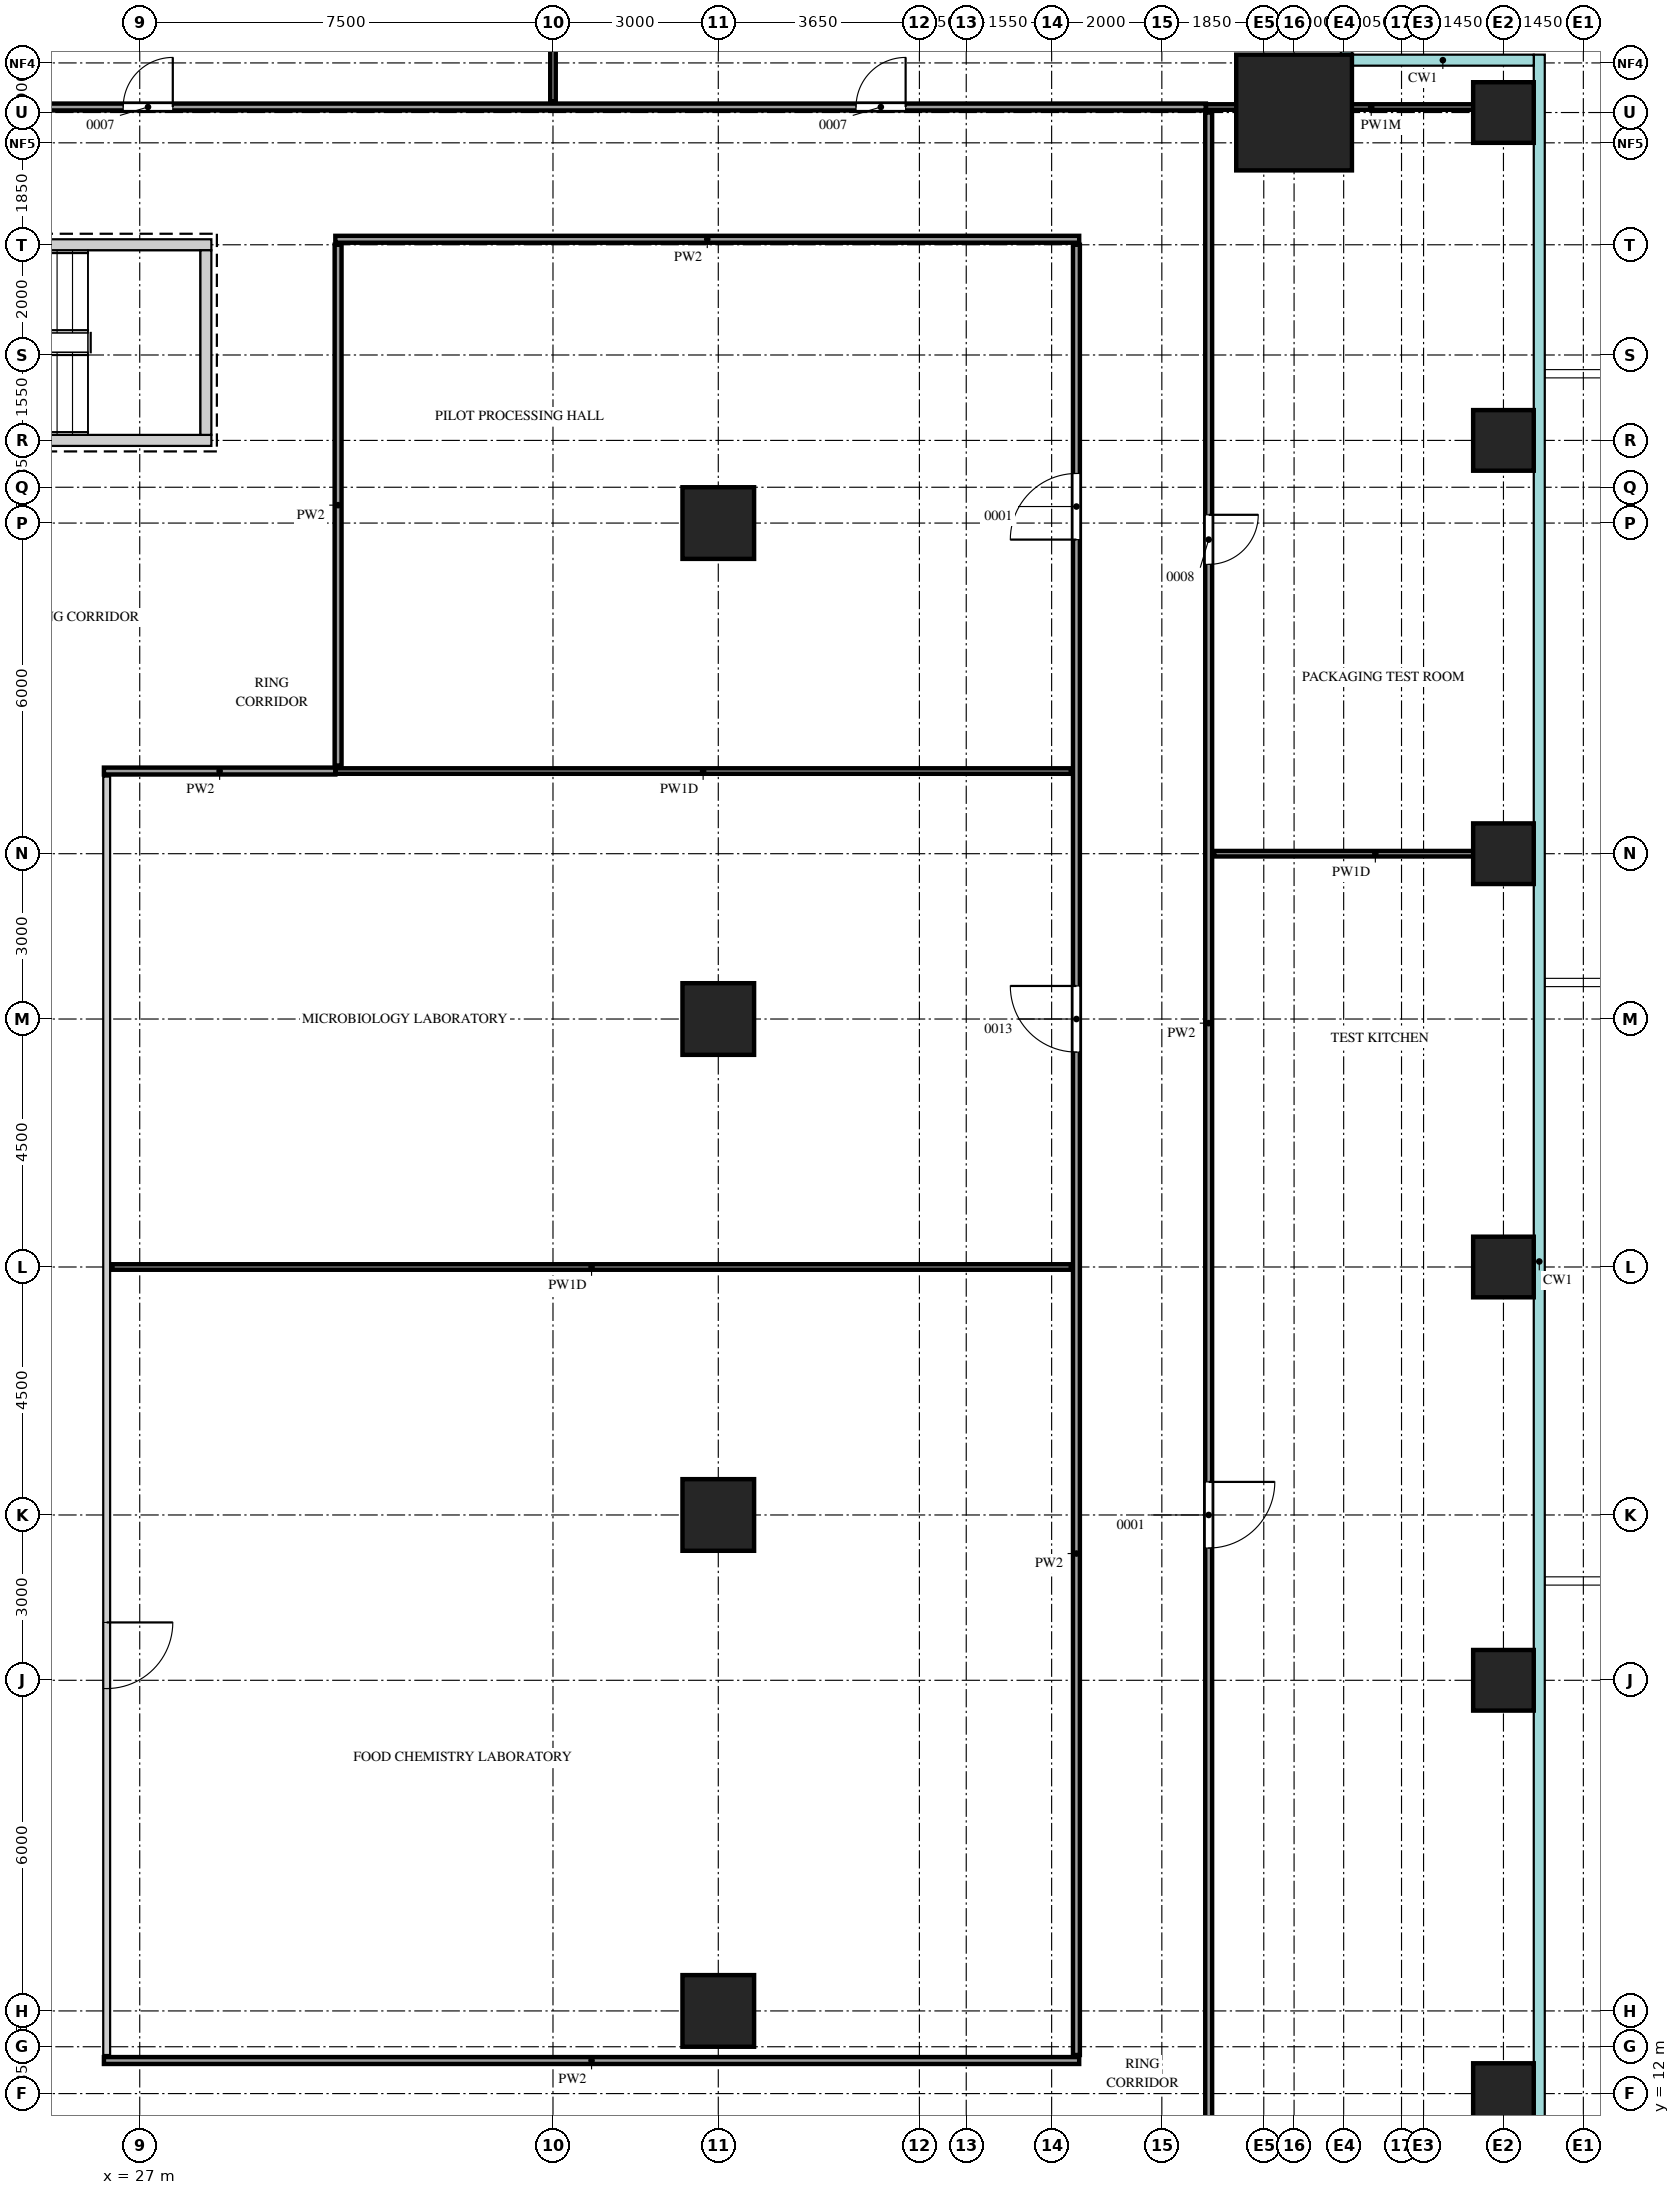
"""IFC4 building model, lengths in metres.
Left out: names, types, materials, properties, quantities, classifications, styles, units other than length and angle.
Written with IfcOpenShell. Run it as: python <this file> out.ifc"""

import sys

from ifc_helpers import new_model, si_unit, direction, frame, frame_2d, origin, origin_2d, place, context, subcontext, project, spatial, rectangle, extrude, source, transform, mapped, element, fill, save


model = new_model("IFC4")
c1 = context("Model", 3, precision=1e-05, world=origin(), true_north=direction((0.0, 1.0)))
c2 = subcontext(c1, "Body", "Model", "MODEL_VIEW")
j1 = project(units=[si_unit("LENGTHUNIT", "METRE"), si_unit("PLANEANGLEUNIT", "RADIAN")], contexts=[c1])
p1 = place(None, origin())
s1 = spatial("IfcSite", under=j1, at=p1, CompositionType="ELEMENT")
p2 = place(p1, origin())
s2 = spatial("IfcBuilding", under=s1, at=p2, CompositionType="ELEMENT")
p3 = place(p2, frame((0.0, 0.0, 119.1)))
s3 = spatial("IfcBuildingStorey", under=s2, at=p3, CompositionType="ELEMENT", Elevation=119.1)
m1 = source(origin(), c2, "Body", "SweptSolid", [
    extrude(rectangle(XDim=7.1, YDim=0.2, at=frame_2d((3.55, 0.0))), origin(), (0.0, 0.0, 1.0), 4.1),
])
p4 = place(p3, frame((21.2, 45.55, 0.0), z_axis=(0.0, 0.0, 1.0), x_axis=(1.0, 0.0, 0.0)))
e1 = element("IfcWall", 1, at=p4, inside=s3, PredefinedType="SHEAR", context=c2, shape_type="MappedRepresentation", body=[
    mapped(m1, transform((0.0, 0.0, 0.0))),
])
m2 = source(origin(), c2, "Body", "SweptSolid", [
    extrude(rectangle(XDim=1.2, YDim=2.1, at=frame_2d((0.6, 1.05))), frame((0.0, 0.11, 0.0), z_axis=(0.0, -1.0, 0.0), x_axis=(1.0, 0.0, 0.0)), (0.0, 0.0, 1.0), 0.22),
])
p5 = place(p4, frame((0.15, 0.0, 0.0)))
e2 = element("IfcOpeningElement", 2, at=p5, cuts=e1, PredefinedType="OPENING", context=c2, shape_type="MappedRepresentation", body=[
    mapped(m2, transform((0.0, 0.0, 0.0))),
])
p6 = place(p3, frame((21.2, 42.0, 0.0), z_axis=(0.0, 0.0, 1.0), x_axis=(1.0, 0.0, 0.0)))
e3 = element("IfcWall", 3, at=p6, inside=s3, PredefinedType="SHEAR", context=c2, shape_type="MappedRepresentation", body=[
    mapped(m1, transform((0.0, 0.0, 0.0))),
])
m3 = source(origin(), c2, "Body", "SweptSolid", [
    extrude(rectangle(XDim=3.35, YDim=0.2, at=frame_2d((1.675, 0.0))), origin(), (0.0, 0.0, 1.0), 4.1),
])
p7 = place(p3, frame((28.2, 42.1, 0.0), z_axis=(0.0, 0.0, 1.0), x_axis=(0.0, 1.0, 0.0)))
e4 = element("IfcWall", 4, at=p7, inside=s3, PredefinedType="SHEAR", context=c2, shape_type="MappedRepresentation", body=[
    mapped(m3, transform((0.0, 0.0, 0.0))),
])
m4 = source(origin(), c2, "Body", "SweptSolid", [
    extrude(rectangle(XDim=2.1, YDim=2.1, at=origin_2d()), origin(), (0.0, 0.0, 1.0), 4.4),
])
p8 = place(p3, frame((47.95, 47.95, 0.0), z_axis=(0.0, 0.0, 1.0), x_axis=(1.0, 0.0, 0.0)))
e5 = element("IfcColumn", 5, at=p8, inside=s3, PredefinedType="COLUMN", context=c2, shape_type="MappedRepresentation", body=[
    mapped(m4, transform((0.0, 0.0, 0.0))),
])
m5 = source(origin(), c2, "Body", "SweptSolid", [
    extrude(rectangle(XDim=1.1, YDim=1.1, at=origin_2d()), origin(), (0.0, 0.0, 1.0), 4.1),
])
for number, where, z_axis, x_axis in (
    (6, (51.75, 12.0, 0.0), (0.0, 0.0, 1.0), (1.0, 0.0, 0.0)),
    (7, (51.75, 19.5, 0.0), (0.0, 0.0, 1.0), (1.0, 0.0, 0.0)),
    (8, (51.75, 27.0, 0.0), (0.0, 0.0, 1.0), (1.0, 0.0, 0.0)),
    (9, (51.75, 34.5, 0.0), (0.0, 0.0, 1.0), (1.0, 0.0, 0.0)),
    (10, (51.75, 42.0, 0.0), (0.0, 0.0, 1.0), (1.0, 0.0, 0.0)),
    (11, (51.75, 47.95, 0.0), (0.0, 0.0, 1.0), (1.0, 0.0, 0.0)),
):
    element("IfcColumn", number, at=place(p3, frame(where, z_axis=z_axis, x_axis=x_axis)), inside=s3, PredefinedType="COLUMN", context=c2, shape_type="MappedRepresentation", body=[
        mapped(m5, transform((0.0, 0.0, 0.0))),
    ])
m6 = source(origin(), c2, "Body", "SweptSolid", [
    extrude(rectangle(XDim=1.3, YDim=1.3, at=origin_2d()), origin(), (0.0, 0.0, 1.0), 4.1),
])
for number, where, z_axis, x_axis in (
    (12, (37.5, 13.5, 0.0), (0.0, 0.0, 1.0), (1.0, 0.0, 0.0)),
    (13, (37.5, 22.5, 0.0), (0.0, 0.0, 1.0), (1.0, 0.0, 0.0)),
    (14, (37.5, 31.5, 0.0), (0.0, 0.0, 1.0), (1.0, 0.0, 0.0)),
    (15, (37.5, 40.5, 0.0), (0.0, 0.0, 1.0), (1.0, 0.0, 0.0)),
):
    element("IfcColumn", number, at=place(p3, frame(where, z_axis=z_axis, x_axis=x_axis)), inside=s3, PredefinedType="COLUMN", context=c2, shape_type="MappedRepresentation", body=[
        mapped(m6, transform((0.0, 0.0, 0.0))),
    ])
m7 = source(origin(), c2, "Body", "SweptSolid", [
    extrude(rectangle(XDim=37.65, YDim=0.125, at=frame_2d((18.825, 0.0))), origin(), (0.0, 0.0, 1.0), 4.2),
])
p9 = place(p3, frame((46.4, 10.3, 0.0), z_axis=(0.0, 0.0, 1.0), x_axis=(0.0, 1.0, 0.0)))
e16 = element("IfcWall", 16, at=p9, inside=s3, PredefinedType="PARTITIONING", context=c2, shape_type="MappedRepresentation", body=[
    mapped(m7, transform((0.0, 0.0, 0.0))),
])
m8 = source(origin(), c2, "Body", "SweptSolid", [
    extrude(rectangle(XDim=1.2, YDim=2.1, at=frame_2d((0.6, 1.05))), frame((0.0, 0.073, 0.0), z_axis=(0.0, -1.0, 0.0), x_axis=(1.0, 0.0, 0.0)), (0.0, 0.0, 1.0), 0.145),
])
p10 = place(p9, frame((11.6, 0.0, 0.0)))
e17 = element("IfcOpeningElement", 17, at=p10, cuts=e16, PredefinedType="OPENING", context=c2, shape_type="MappedRepresentation", body=[
    mapped(m8, transform((0.0, 0.0, 0.0))),
])
m9 = source(origin(), c2, "Body", "SweptSolid", [
    extrude(rectangle(XDim=0.9, YDim=2.1, at=frame_2d((0.45, 1.05))), frame((0.0, 0.073, 0.0), z_axis=(0.0, -1.0, 0.0), x_axis=(1.0, 0.0, 0.0)), (0.0, 0.0, 1.0), 0.145),
])
p11 = place(p9, frame((29.45, 0.0, 0.0)))
e18 = element("IfcOpeningElement", 18, at=p11, cuts=e16, PredefinedType="OPENING", context=c2, shape_type="MappedRepresentation", body=[
    mapped(m9, transform((0.0, 0.0, 0.0))),
])
m10 = source(origin(), c2, "Body", "SweptSolid", [
    extrude(rectangle(XDim=17.7, YDim=0.125, at=frame_2d((8.85, 0.0))), origin(), (0.0, 0.0, 1.0), 4.2),
])
p12 = place(p3, frame((26.35, 12.6, 0.0), z_axis=(0.0, 0.0, 1.0), x_axis=(1.0, 0.0, 0.0)))
e19 = element("IfcWall", 19, at=p12, inside=s3, PredefinedType="PARTITIONING", context=c2, shape_type="MappedRepresentation", body=[
    mapped(m10, transform((0.0, 0.0, 0.0))),
])
m11 = source(origin(), c2, "Body", "SweptSolid", [
    extrude(rectangle(XDim=23.2, YDim=0.125, at=frame_2d((11.6, 0.0))), origin(), (0.0, 0.0, 1.0), 4.2),
])
p13 = place(p3, frame((26.4, 12.7, 0.0), z_axis=(0.0, 0.0, 1.0), x_axis=(0.0, 1.0, 0.0)))
e20 = element("IfcWall", 20, at=p13, inside=s3, PredefinedType="PARTITIONING", context=c2, shape_type="MappedRepresentation", body=[
    mapped(m11, transform((0.0, 0.0, 0.0))),
])
p14 = place(p13, frame((6.65, 0.0, 0.0)))
e21 = element("IfcOpeningElement", 21, at=p14, cuts=e20, PredefinedType="OPENING", context=c2, shape_type="MappedRepresentation", body=[
    mapped(m8, transform((0.0, 0.0, 0.0))),
])
m12 = source(origin(), c2, "Body", "SweptSolid", [
    extrude(rectangle(XDim=32.85, YDim=0.125, at=frame_2d((16.425, 0.0))), origin(), (0.0, 0.0, 1.0), 4.2),
])
p15 = place(p3, frame((44.0, 12.7, 0.0), z_axis=(0.0, 0.0, 1.0), x_axis=(0.0, 1.0, 0.0)))
e22 = element("IfcWall", 22, at=p15, inside=s3, PredefinedType="PARTITIONING", context=c2, shape_type="MappedRepresentation", body=[
    mapped(m12, transform((0.0, 0.0, 0.0))),
])
p16 = place(p15, frame((18.2, 0.0, 0.0)))
e23 = element("IfcOpeningElement", 23, at=p16, cuts=e22, PredefinedType="OPENING", context=c2, shape_type="MappedRepresentation", body=[
    mapped(m8, transform((0.0, 0.0, 0.0))),
])
p17 = place(p15, frame((27.5, 0.0, 0.0)))
e24 = element("IfcOpeningElement", 24, at=p17, cuts=e22, PredefinedType="OPENING", context=c2, shape_type="MappedRepresentation", body=[
    mapped(m8, transform((0.0, 0.0, 0.0))),
])
m13 = source(origin(), c2, "Body", "SweptSolid", [
    extrude(rectangle(XDim=17.4, YDim=0.1, at=frame_2d((8.7, 0.0))), origin(), (0.0, 0.0, 1.0), 4.2),
])
p18 = place(p3, frame((26.5, 27.0, 0.0), z_axis=(0.0, 0.0, 1.0), x_axis=(1.0, 0.0, 0.0)))
e25 = element("IfcWall", 25, at=p18, inside=s3, PredefinedType="PARTITIONING", context=c2, shape_type="MappedRepresentation", body=[
    mapped(m13, transform((0.0, 0.0, 0.0))),
])
m14 = source(origin(), c2, "Body", "SweptSolid", [
    extrude(rectangle(XDim=5.85, YDim=0.1, at=frame_2d((2.925, 0.0))), origin(), (0.0, 0.0, 1.0), 4.2),
])
p19 = place(p3, frame((46.5, 34.5, 0.0), z_axis=(0.0, 0.0, 1.0), x_axis=(1.0, 0.0, 0.0)))
e26 = element("IfcWall", 26, at=p19, inside=s3, PredefinedType="PARTITIONING", context=c2, shape_type="MappedRepresentation", body=[
    mapped(m14, transform((0.0, 0.0, 0.0))),
])
m15 = source(origin(), c2, "Body", "SweptSolid", [
    extrude(rectangle(XDim=4.2, YDim=0.125, at=frame_2d((2.1, 0.0))), origin(), (0.0, 0.0, 1.0), 4.2),
])
p20 = place(p3, frame((26.35, 36.0, 0.0), z_axis=(0.0, 0.0, 1.0), x_axis=(1.0, 0.0, 0.0)))
e27 = element("IfcWall", 27, at=p20, inside=s3, PredefinedType="PARTITIONING", context=c2, shape_type="MappedRepresentation", body=[
    mapped(m15, transform((0.0, 0.0, 0.0))),
])
m16 = source(origin(), c2, "Body", "SweptSolid", [
    extrude(rectangle(XDim=13.35, YDim=0.1, at=frame_2d((6.675, 0.0))), origin(), (0.0, 0.0, 1.0), 4.2),
])
p21 = place(p3, frame((30.55, 36.0, 0.0), z_axis=(0.0, 0.0, 1.0), x_axis=(1.0, 0.0, 0.0)))
e28 = element("IfcWall", 28, at=p21, inside=s3, PredefinedType="PARTITIONING", context=c2, shape_type="MappedRepresentation", body=[
    mapped(m16, transform((0.0, 0.0, 0.0))),
])
m17 = source(origin(), c2, "Body", "SweptSolid", [
    extrude(rectangle(XDim=9.45, YDim=0.125, at=frame_2d((4.725, 0.0))), origin(), (0.0, 0.0, 1.0), 4.2),
])
p22 = place(p3, frame((30.6, 36.1, 0.0), z_axis=(0.0, 0.0, 1.0), x_axis=(0.0, 1.0, 0.0)))
e29 = element("IfcWall", 29, at=p22, inside=s3, PredefinedType="PARTITIONING", context=c2, shape_type="MappedRepresentation", body=[
    mapped(m17, transform((0.0, 0.0, 0.0))),
])
m18 = source(origin(), c2, "Body", "SweptSolid", [
    extrude(rectangle(XDim=13.5, YDim=0.125, at=frame_2d((6.75, 0.0))), origin(), (0.0, 0.0, 1.0), 4.2),
])
p23 = place(p3, frame((30.55, 45.65, 0.0), z_axis=(0.0, 0.0, 1.0), x_axis=(1.0, 0.0, 0.0)))
e30 = element("IfcWall", 30, at=p23, inside=s3, PredefinedType="PARTITIONING", context=c2, shape_type="MappedRepresentation", body=[
    mapped(m18, transform((0.0, 0.0, 0.0))),
])
m19 = source(origin(), c2, "Body", "SweptSolid", [
    extrude(rectangle(XDim=42.2, YDim=0.125, at=frame_2d((21.1, 0.0))), origin(), (0.0, 0.0, 1.0), 3.55),
])
p24 = place(p3, frame((4.15, 48.05, 0.0), z_axis=(0.0, 0.0, 1.0), x_axis=(1.0, 0.0, 0.0)))
e31 = element("IfcWall", 31, at=p24, inside=s3, PredefinedType="PARTITIONING", context=c2, shape_type="MappedRepresentation", body=[
    mapped(m19, transform((0.0, 0.0, 0.0))),
])
p25 = place(p24, frame((7.25, 0.0, 0.0)))
e32 = element("IfcOpeningElement", 32, at=p25, cuts=e31, PredefinedType="OPENING", context=c2, shape_type="MappedRepresentation", body=[
    mapped(m9, transform((0.0, 0.0, 0.0))),
])
p26 = place(p24, frame((22.55, 0.0, 0.0)))
e33 = element("IfcOpeningElement", 33, at=p26, cuts=e31, PredefinedType="OPENING", context=c2, shape_type="MappedRepresentation", body=[
    mapped(m9, transform((0.0, 0.0, 0.0))),
])
p27 = place(p24, frame((35.85, 0.0, 0.0)))
e34 = element("IfcOpeningElement", 34, at=p27, cuts=e31, PredefinedType="OPENING", context=c2, shape_type="MappedRepresentation", body=[
    mapped(m9, transform((0.0, 0.0, 0.0))),
])
m20 = source(origin(), c2, "Body", "SweptSolid", [
    extrude(rectangle(XDim=6.0, YDim=0.1, at=frame_2d((3.0, 0.0))), origin(), (0.0, 0.0, 1.0), 3.55),
])
p28 = place(p3, frame((46.35, 48.05, 0.0), z_axis=(0.0, 0.0, 1.0), x_axis=(1.0, 0.0, 0.0)))
e35 = element("IfcWall", 35, at=p28, inside=s3, PredefinedType="PARTITIONING", context=c2, shape_type="MappedRepresentation", body=[
    mapped(m20, transform((0.0, 0.0, 0.0))),
])
m21 = source(origin(), c2, "Body", "SweptSolid", [
    extrude(rectangle(XDim=4.2, YDim=0.1, at=frame_2d((2.1, 0.0))), origin(), (0.0, 0.0, 1.0), 3.6),
])
p29 = place(p3, frame((34.5, 48.15, 0.0), z_axis=(0.0, 0.0, 1.0), x_axis=(0.0, 1.0, 0.0)))
e36 = element("IfcWall", 36, at=p29, inside=s3, PredefinedType="PARTITIONING", context=c2, shape_type="MappedRepresentation", body=[
    mapped(m21, transform((0.0, 0.0, 0.0))),
])
m22 = source(origin(), c2, "Body", "SweptSolid", [
    extrude(rectangle(XDim=1.2, YDim=2.1, at=frame_2d((0.6, 1.05))), frame((0.0, 0.025, 0.0), z_axis=(0.0, -1.0, 0.0), x_axis=(1.0, 0.0, 0.0)), (0.0, 0.0, 1.0), 0.05),
])
p30 = place(p14, origin())
e37 = element("IfcDoor", 37, at=p30, inside=s3, OperationType="SINGLE_SWING_RIGHT", PredefinedType="DOOR", context=c2, shape_type="MappedRepresentation", body=[
    mapped(m22, transform((0.0, 0.0, 0.0))),
])
fill(e21, e37)
p31 = place(p16, origin())
e38 = element("IfcDoor", 38, at=p31, inside=s3, OperationType="SINGLE_SWING_LEFT", PredefinedType="DOOR", context=c2, shape_type="MappedRepresentation", body=[
    mapped(m22, transform((0.0, 0.0, 0.0))),
])
fill(e23, e38)
p32 = place(p17, origin())
e39 = element("IfcDoor", 39, at=p32, inside=s3, OperationType="SINGLE_SWING_RIGHT", PredefinedType="DOOR", context=c2, shape_type="MappedRepresentation", body=[
    mapped(m22, transform((0.0, 0.0, 0.0))),
])
fill(e24, e39)
p33 = place(p10, origin())
e40 = element("IfcDoor", 40, at=p33, inside=s3, OperationType="SINGLE_SWING_RIGHT", PredefinedType="DOOR", context=c2, shape_type="MappedRepresentation", body=[
    mapped(m22, transform((0.0, 0.0, 0.0))),
])
fill(e17, e40)
m23 = source(origin(), c2, "Body", "SweptSolid", [
    extrude(rectangle(XDim=0.9, YDim=2.1, at=frame_2d((0.45, 1.05))), frame((0.0, 0.025, 0.0), z_axis=(0.0, -1.0, 0.0), x_axis=(1.0, 0.0, 0.0)), (0.0, 0.0, 1.0), 0.05),
])
p34 = place(p11, origin())
e41 = element("IfcDoor", 41, at=p34, inside=s3, OperationType="SINGLE_SWING_RIGHT", PredefinedType="DOOR", context=c2, shape_type="MappedRepresentation", body=[
    mapped(m23, transform((0.0, 0.0, 0.0))),
])
fill(e18, e41)
p35 = place(p26, origin())
e42 = element("IfcDoor", 42, at=p35, inside=s3, OperationType="SINGLE_SWING_LEFT", PredefinedType="DOOR", context=c2, shape_type="MappedRepresentation", body=[
    mapped(m23, transform((0.0, 0.0, 0.0))),
])
fill(e33, e42)
p36 = place(p27, origin())
e43 = element("IfcDoor", 43, at=p36, inside=s3, OperationType="SINGLE_SWING_LEFT", PredefinedType="DOOR", context=c2, shape_type="MappedRepresentation", body=[
    mapped(m23, transform((0.0, 0.0, 0.0))),
])
fill(e34, e43)
save(model, sys.argv[1])
